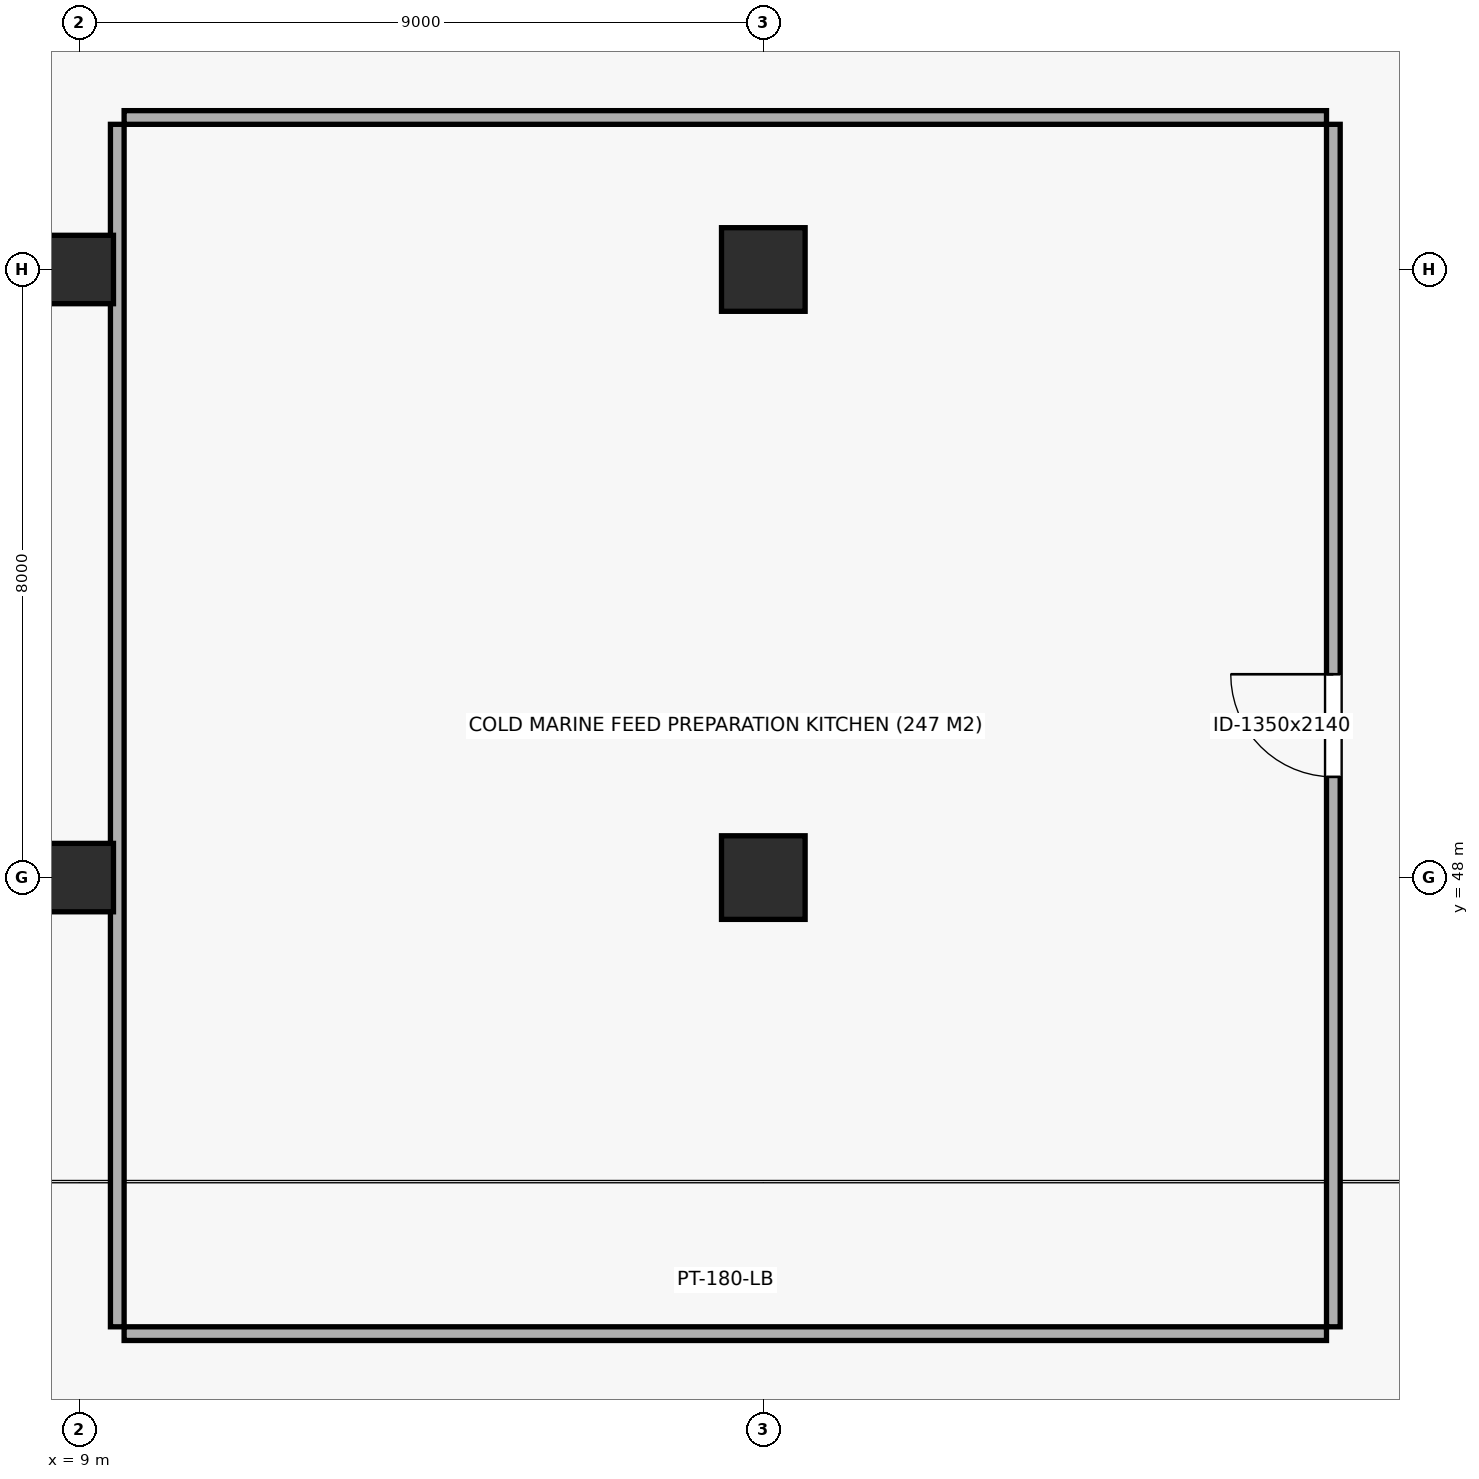
"""IFC4 building model, lengths in metres.
Left out: names, types, materials, properties, quantities, classifications, styles, units other than length and angle.
Written with IfcOpenShell. Run it as: python <this file> out.ifc"""

import sys

from ifc_helpers import new_model, si_unit, direction, frame, frame_2d, origin, origin_2d, place, context, subcontext, project, spatial, rectangle, extrude, element, fill, save


model = new_model("IFC4")
c1 = context("Model", 3, precision=1e-05, world=origin(), true_north=direction((0.0, 1.0)))
c2 = subcontext(c1, "Body", "Model", "MODEL_VIEW")
j1 = project(units=[si_unit("LENGTHUNIT", "METRE"), si_unit("PLANEANGLEUNIT", "RADIAN")], contexts=[c1])
p1 = place(None, origin())
s1 = spatial("IfcSite", under=j1, at=p1, CompositionType="ELEMENT")
p2 = place(p1, origin())
s2 = spatial("IfcBuilding", under=s1, at=p2, CompositionType="ELEMENT")
p3 = place(p2, frame((0.0, 0.0, -4.5)))
s3 = spatial("IfcBuildingStorey", under=s2, at=p3, CompositionType="ELEMENT", Elevation=-4.5)
for number, where, z_axis, x_axis in (
    (1, (9.0, 48.0, 0.0), (0.0, 0.0, 1.0), (1.0, 0.0, 0.0)),
    (2, (9.0, 56.0, 0.0), (0.0, 0.0, 1.0), (1.0, 0.0, 0.0)),
):
    element("IfcColumn", number, at=place(p3, frame(where, z_axis=z_axis, x_axis=x_axis)), inside=s3, PredefinedType="COLUMN", context=c2, shape_type="SweptSolid", body=[
        extrude(rectangle(XDim=0.9, YDim=0.9, at=origin_2d()), origin(), (0.0, 0.0, 1.0), 4.5),
    ])
for number, where, z_axis, x_axis in (
    (3, (18.0, 48.0, 0.0), (0.0, 0.0, 1.0), (1.0, 0.0, 0.0)),
    (4, (18.0, 56.0, 0.0), (0.0, 0.0, 1.0), (1.0, 0.0, 0.0)),
):
    element("IfcColumn", number, at=place(p3, frame(where, z_axis=z_axis, x_axis=x_axis)), inside=s3, PredefinedType="COLUMN", context=c2, shape_type="SweptSolid", body=[
        extrude(rectangle(XDim=1.1, YDim=1.1, at=origin_2d()), origin(), (0.0, 0.0, 1.0), 4.5),
    ])
for number, where, z_axis, x_axis in (
    (5, (9.59, 42.0, 0.0), (0.0, 0.0, 1.0), (1.0, 0.0, 0.0)),
    (6, (9.59, 58.0, 0.0), (0.0, 0.0, 1.0), (1.0, 0.0, 0.0)),
    (7, (9.5, 42.09, 0.0), (0.0, 0.0, 1.0), (0.0, 1.0, 0.0)),
):
    element("IfcWall", number, at=place(p3, frame(where, z_axis=z_axis, x_axis=x_axis)), inside=s3, PredefinedType="PARTITIONING", context=c2, shape_type="SweptSolid", body=[
        extrude(rectangle(XDim=15.82, YDim=0.18, at=frame_2d((7.91, 0.0))), origin(), (0.0, 0.0, 1.0), 4.15),
    ])
p4 = place(p3, frame((25.5, 42.09, 0.0), z_axis=(0.0, 0.0, 1.0), x_axis=(0.0, 1.0, 0.0)))
e8 = element("IfcWall", 8, at=p4, inside=s3, PredefinedType="PARTITIONING", context=c2, shape_type="SweptSolid", body=[
    extrude(rectangle(XDim=15.82, YDim=0.18, at=frame_2d((7.91, 0.0))), origin(), (0.0, 0.0, 1.0), 4.15),
])
p5 = place(p4, frame((7.235, 0.0, 0.0)))
e9 = element("IfcOpeningElement", 9, at=p5, cuts=e8, PredefinedType="OPENING", context=c2, shape_type="SweptSolid", body=[
    extrude(rectangle(XDim=1.35, YDim=2.14, at=frame_2d((0.675, 1.07))), frame((0.0, 0.102, 0.0), z_axis=(0.0, -1.0, 0.0), x_axis=(1.0, 0.0, 0.0)), (0.0, 0.0, 1.0), 0.204),
])
p6 = place(p5, origin())
e10 = element("IfcDoor", 10, at=p6, inside=s3, OperationType="SINGLE_SWING_RIGHT", PredefinedType="DOOR", context=c2, shape_type="SweptSolid", body=[
    extrude(rectangle(XDim=1.35, YDim=2.14, at=frame_2d((0.675, 1.07))), frame((0.0, 0.025, 0.0), z_axis=(0.0, -1.0, 0.0), x_axis=(1.0, 0.0, 0.0)), (0.0, 0.0, 1.0), 0.05),
])
fill(e9, e10)
save(model, sys.argv[1])
